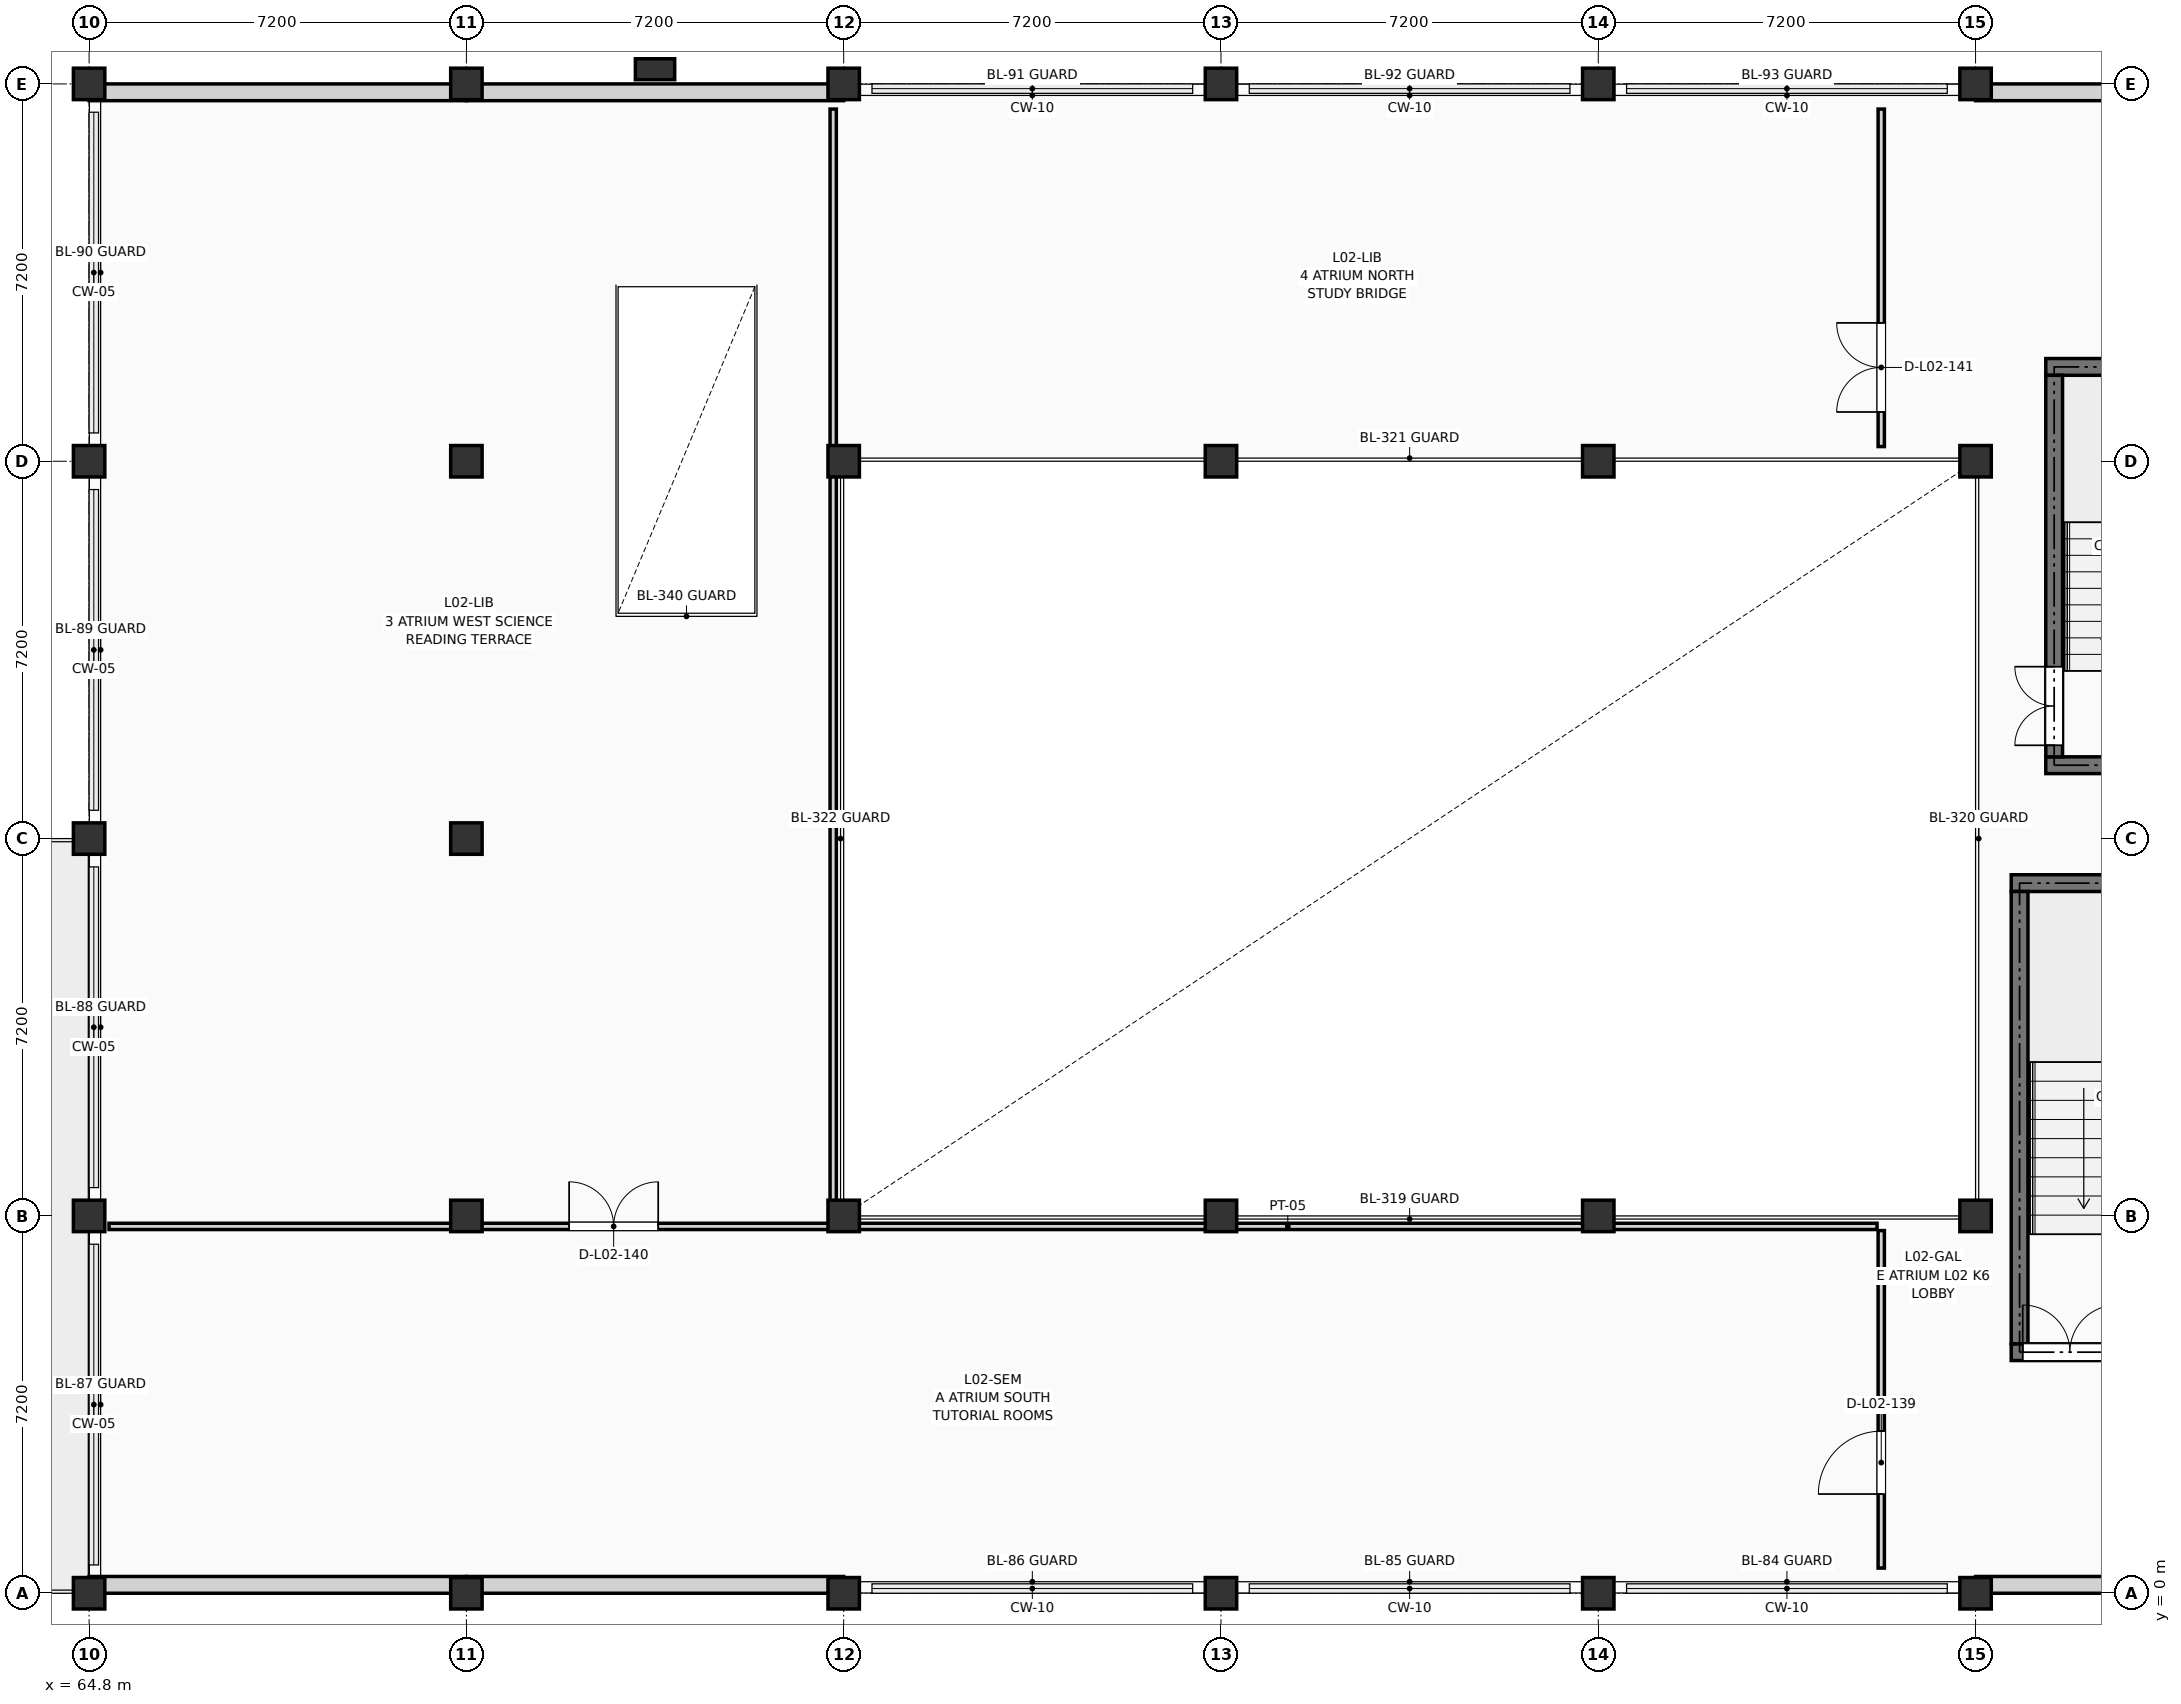
"""IFC4 building model, lengths in metres.
Left out: names, types, materials, properties, quantities, classifications, styles, units other than length and angle.
Written with IfcOpenShell. Run it as: python <this file> out.ifc"""

import sys

from ifc_helpers import new_model, si_unit, direction, frame, frame_2d, origin, origin_2d, place, context, subcontext, project, spatial, rectangle, extrude, element, fill, save


model = new_model("IFC4")
c1 = context("Model", 3, precision=1e-05, world=origin(), true_north=direction((0.0, 1.0)))
c2 = subcontext(c1, "Body", "Model", "MODEL_VIEW")
j1 = project(units=[si_unit("LENGTHUNIT", "METRE"), si_unit("PLANEANGLEUNIT", "RADIAN")], contexts=[c1])
p1 = place(None, origin())
s1 = spatial("IfcSite", under=j1, at=p1, CompositionType="ELEMENT")
p2 = place(p1, origin())
s2 = spatial("IfcBuilding", under=s1, at=p2, CompositionType="ELEMENT")
p3 = place(p2, frame((0.0, 0.0, 8.55)))
s3 = spatial("IfcBuildingStorey", under=s2, at=p3, CompositionType="ELEMENT", Elevation=8.55)
for number, where, z_axis, x_axis in (
    (1, (64.8, 0.0, 0.0), (0.0, 0.0, 1.0), (1.0, 0.0, 0.0)),
    (2, (64.8, 7.2, 0.0), (0.0, 0.0, 1.0), (1.0, 0.0, 0.0)),
    (3, (64.8, 14.4, 0.0), (0.0, 0.0, 1.0), (1.0, 0.0, 0.0)),
    (4, (64.8, 21.6, 0.0), (0.0, 0.0, 1.0), (1.0, 0.0, 0.0)),
    (5, (64.8, 28.8, 0.0), (0.0, 0.0, 1.0), (1.0, 0.0, 0.0)),
    (6, (72.0, 0.0, 0.0), (0.0, 0.0, 1.0), (1.0, 0.0, 0.0)),
    (7, (72.0, 7.2, 0.0), (0.0, 0.0, 1.0), (1.0, 0.0, 0.0)),
    (8, (72.0, 14.4, 0.0), (0.0, 0.0, 1.0), (1.0, 0.0, 0.0)),
    (9, (72.0, 21.6, 0.0), (0.0, 0.0, 1.0), (1.0, 0.0, 0.0)),
    (10, (72.0, 28.8, 0.0), (0.0, 0.0, 1.0), (1.0, 0.0, 0.0)),
    (11, (79.2, 0.0, 0.0), (0.0, 0.0, 1.0), (1.0, 0.0, 0.0)),
    (12, (79.2, 7.2, 0.0), (0.0, 0.0, 1.0), (1.0, 0.0, 0.0)),
    (13, (79.2, 21.6, 0.0), (0.0, 0.0, 1.0), (1.0, 0.0, 0.0)),
    (14, (79.2, 28.8, 0.0), (0.0, 0.0, 1.0), (1.0, 0.0, 0.0)),
    (15, (86.4, 0.0, 0.0), (0.0, 0.0, 1.0), (1.0, 0.0, 0.0)),
    (16, (86.4, 7.2, 0.0), (0.0, 0.0, 1.0), (1.0, 0.0, 0.0)),
    (17, (86.4, 21.6, 0.0), (0.0, 0.0, 1.0), (1.0, 0.0, 0.0)),
    (18, (86.4, 28.8, 0.0), (0.0, 0.0, 1.0), (1.0, 0.0, 0.0)),
    (19, (93.6, 0.0, 0.0), (0.0, 0.0, 1.0), (1.0, 0.0, 0.0)),
    (20, (93.6, 7.2, 0.0), (0.0, 0.0, 1.0), (1.0, 0.0, 0.0)),
    (21, (93.6, 21.6, 0.0), (0.0, 0.0, 1.0), (1.0, 0.0, 0.0)),
    (22, (93.6, 28.8, 0.0), (0.0, 0.0, 1.0), (1.0, 0.0, 0.0)),
    (23, (100.8, 0.0, 0.0), (0.0, 0.0, 1.0), (1.0, 0.0, 0.0)),
    (24, (100.8, 7.2, 0.0), (0.0, 0.0, 1.0), (1.0, 0.0, 0.0)),
    (25, (100.8, 21.6, 0.0), (0.0, 0.0, 1.0), (1.0, 0.0, 0.0)),
    (26, (100.8, 28.8, 0.0), (0.0, 0.0, 1.0), (1.0, 0.0, 0.0)),
):
    element("IfcColumn", number, at=place(p3, frame(where, z_axis=z_axis, x_axis=x_axis)), inside=s3, PredefinedType="COLUMN", context=c2, shape_type="SweptSolid", body=[
        extrude(rectangle(XDim=0.6, YDim=0.6, at=origin_2d()), origin(), (0.0, 0.0, 1.0), 3.6),
    ])
p4 = place(p3, frame((75.6, 29.08, 0.0), z_axis=(0.0, 0.0, 1.0), x_axis=(0.0, 1.0, 0.0)))
e27 = element("IfcColumn", 27, at=p4, inside=s3, PredefinedType="PILASTER", context=c2, shape_type="SweptSolid", body=[
    extrude(rectangle(XDim=0.4, YDim=0.75, at=origin_2d()), origin(), (0.0, 0.0, 1.0), 3.6),
])
for number, where, z_axis, x_axis in (
    (28, (100.8, 0.16, 0.0), (0.0, 0.0, 1.0), (1.0, 0.0, 0.0)),
    (29, (72.0, 0.16, 0.0), (0.0, 0.0, 1.0), (1.0, 0.0, 0.0)),
    (30, (64.8, 0.16, 0.0), (0.0, 0.0, 1.0), (1.0, 0.0, 0.0)),
    (31, (64.8, 28.64, 0.0), (0.0, 0.0, 1.0), (1.0, 0.0, 0.0)),
    (32, (72.0, 28.64, 0.0), (0.0, 0.0, 1.0), (1.0, 0.0, 0.0)),
    (33, (100.8, 28.64, 0.0), (0.0, 0.0, 1.0), (1.0, 0.0, 0.0)),
):
    element("IfcWall", number, at=place(p3, frame(where, z_axis=z_axis, x_axis=x_axis)), inside=s3, PredefinedType="SOLIDWALL", context=c2, shape_type="SweptSolid", body=[
        extrude(rectangle(XDim=7.2, YDim=0.32, at=frame_2d((3.6, 0.0))), origin(), (0.0, 0.0, 1.0), 2.84),
    ])
for number, where, z_axis, x_axis in (
    (34, (102.14, 15.8, 0.0), (0.0, 0.0, 1.0), (1.0, 0.0, 0.0)),
    (35, (102.14, 23.4, 0.0), (0.0, 0.0, 1.0), (1.0, 0.0, 0.0)),
):
    element("IfcWall", number, at=place(p3, frame(where, z_axis=z_axis, x_axis=x_axis)), inside=s3, PredefinedType="SHEAR", context=c2, shape_type="SweptSolid", body=[
        extrude(rectangle(XDim=4.44, YDim=0.32, at=frame_2d((2.22, 0.0))), origin(), (0.0, 0.0, 1.0), 3.39),
    ])
p5 = place(p3, frame((102.3, 15.96, 0.0), z_axis=(0.0, 0.0, 1.0), x_axis=(0.0, 1.0, 0.0)))
e36 = element("IfcWall", 36, at=p5, inside=s3, PredefinedType="SHEAR", context=c2, shape_type="SweptSolid", body=[
    extrude(rectangle(XDim=7.28, YDim=0.32, at=frame_2d((3.64, 0.0))), origin(), (0.0, 0.0, 1.0), 3.39),
])
p6 = place(p5, frame((0.22, 0.0, 0.0)))
e37 = element("IfcOpeningElement", 37, at=p6, cuts=e36, PredefinedType="OPENING", context=c2, shape_type="SweptSolid", body=[
    extrude(rectangle(XDim=1.5, YDim=2.2, at=frame_2d((0.75, 1.1))), frame((0.0, 0.172, 0.0), z_axis=(0.0, -1.0, 0.0), x_axis=(1.0, 0.0, 0.0)), (0.0, 0.0, 1.0), 0.344),
])
p7 = place(p3, frame((101.48, 4.6, 0.0), z_axis=(0.0, 0.0, 1.0), x_axis=(1.0, 0.0, 0.0)))
e38 = element("IfcWall", 38, at=p7, inside=s3, PredefinedType="SHEAR", context=c2, shape_type="SweptSolid", body=[
    extrude(rectangle(XDim=5.84, YDim=0.32, at=frame_2d((2.92, 0.0))), origin(), (0.0, 0.0, 1.0), 3.39),
])
p8 = place(p7, frame((0.22, 0.0, 0.0)))
e39 = element("IfcOpeningElement", 39, at=p8, cuts=e38, PredefinedType="OPENING", context=c2, shape_type="SweptSolid", body=[
    extrude(rectangle(XDim=1.8, YDim=2.2, at=frame_2d((0.9, 1.1))), frame((0.0, 0.172, 0.0), z_axis=(0.0, -1.0, 0.0), x_axis=(1.0, 0.0, 0.0)), (0.0, 0.0, 1.0), 0.344),
])
p9 = place(p3, frame((101.48, 13.55, 0.0), z_axis=(0.0, 0.0, 1.0), x_axis=(1.0, 0.0, 0.0)))
e40 = element("IfcWall", 40, at=p9, inside=s3, PredefinedType="SHEAR", context=c2, shape_type="SweptSolid", body=[
    extrude(rectangle(XDim=5.84, YDim=0.32, at=frame_2d((2.92, 0.0))), origin(), (0.0, 0.0, 1.0), 3.39),
])
p10 = place(p3, frame((101.64, 4.76, 0.0), z_axis=(0.0, 0.0, 1.0), x_axis=(0.0, 1.0, 0.0)))
e41 = element("IfcWall", 41, at=p10, inside=s3, PredefinedType="SHEAR", context=c2, shape_type="SweptSolid", body=[
    extrude(rectangle(XDim=8.63, YDim=0.32, at=frame_2d((4.315, 0.0))), origin(), (0.0, 0.0, 1.0), 3.39),
])
p11 = place(p3, frame((99.0, 0.48, 0.0), z_axis=(0.0, 0.0, 1.0), x_axis=(0.0, 1.0, 0.0)))
e42 = element("IfcWall", 42, at=p11, inside=s3, PredefinedType="PARTITIONING", context=c2, shape_type="SweptSolid", body=[
    extrude(rectangle(XDim=6.44, YDim=0.12, at=frame_2d((3.22, 0.0))), origin(), (0.0, 0.0, 1.0), 3.375),
])
p12 = place(p11, frame((1.413, 0.0, 0.0)))
e43 = element("IfcOpeningElement", 43, at=p12, cuts=e42, PredefinedType="OPENING", context=c2, shape_type="SweptSolid", body=[
    extrude(rectangle(XDim=1.2, YDim=2.15, at=frame_2d((0.6, 1.075))), frame((0.0, 0.072, 0.0), z_axis=(0.0, -1.0, 0.0), x_axis=(1.0, 0.0, 0.0)), (0.0, 0.0, 1.0), 0.144),
])
p13 = place(p3, frame((65.18, 7.0, 0.0), z_axis=(0.0, 0.0, 1.0), x_axis=(1.0, 0.0, 0.0)))
e44 = element("IfcWall", 44, at=p13, inside=s3, PredefinedType="PARTITIONING", context=c2, shape_type="SweptSolid", body=[
    extrude(rectangle(XDim=33.74, YDim=0.12, at=frame_2d((16.87, 0.0))), origin(), (0.0, 0.0, 1.0), 2.595),
])
p14 = place(p13, frame((8.781, 0.0, 0.0)))
e45 = element("IfcOpeningElement", 45, at=p14, cuts=e44, PredefinedType="OPENING", context=c2, shape_type="SweptSolid", body=[
    extrude(rectangle(XDim=1.7, YDim=2.28, at=frame_2d((0.85, 1.14))), frame((0.0, 0.072, 0.0), z_axis=(0.0, -1.0, 0.0), x_axis=(1.0, 0.0, 0.0)), (0.0, 0.0, 1.0), 0.144),
])
p15 = place(p3, frame((79.0, 7.1, 0.0), z_axis=(0.0, 0.0, 1.0), x_axis=(0.0, 1.0, 0.0)))
e46 = element("IfcWall", 46, at=p15, inside=s3, PredefinedType="PARTITIONING", context=c2, shape_type="SweptSolid", body=[
    extrude(rectangle(XDim=21.22, YDim=0.12, at=frame_2d((10.61, 0.0))), origin(), (0.0, 0.0, 1.0), 3.375),
])
p16 = place(p3, frame((99.0, 21.88, 0.0), z_axis=(0.0, 0.0, 1.0), x_axis=(0.0, 1.0, 0.0)))
e47 = element("IfcWall", 47, at=p16, inside=s3, PredefinedType="PARTITIONING", context=c2, shape_type="SweptSolid", body=[
    extrude(rectangle(XDim=6.44, YDim=0.12, at=frame_2d((3.22, 0.0))), origin(), (0.0, 0.0, 1.0), 3.375),
])
p17 = place(p16, frame((0.66, 0.0, 0.0)))
e48 = element("IfcOpeningElement", 48, at=p17, cuts=e47, PredefinedType="OPENING", context=c2, shape_type="SweptSolid", body=[
    extrude(rectangle(XDim=1.7, YDim=2.28, at=frame_2d((0.85, 1.14))), frame((0.0, 0.072, 0.0), z_axis=(0.0, -1.0, 0.0), x_axis=(1.0, 0.0, 0.0)), (0.0, 0.0, 1.0), 0.144),
])
p18 = place(p6, origin())
e49 = element("IfcDoor", 49, at=p18, inside=s3, OperationType="DOUBLE_DOOR_SINGLE_SWING", PredefinedType="DOOR", context=c2, shape_type="SweptSolid", body=[
    extrude(rectangle(XDim=1.5, YDim=2.2, at=frame_2d((0.75, 1.1))), frame((0.0, 0.025, 0.0), z_axis=(0.0, -1.0, 0.0), x_axis=(1.0, 0.0, 0.0)), (0.0, 0.0, 1.0), 0.05),
])
fill(e37, e49)
p19 = place(p8, origin())
e50 = element("IfcDoor", 50, at=p19, inside=s3, OperationType="DOUBLE_DOOR_SINGLE_SWING", PredefinedType="DOOR", context=c2, shape_type="SweptSolid", body=[
    extrude(rectangle(XDim=1.8, YDim=2.2, at=frame_2d((0.9, 1.1))), frame((0.0, 0.025, 0.0), z_axis=(0.0, -1.0, 0.0), x_axis=(1.0, 0.0, 0.0)), (0.0, 0.0, 1.0), 0.05),
])
fill(e39, e50)
p20 = place(p12, origin())
e51 = element("IfcDoor", 51, at=p20, inside=s3, OperationType="SINGLE_SWING_LEFT", PredefinedType="DOOR", context=c2, shape_type="SweptSolid", body=[
    extrude(rectangle(XDim=1.2, YDim=2.15, at=frame_2d((0.6, 1.075))), frame((0.0, 0.025, 0.0), z_axis=(0.0, -1.0, 0.0), x_axis=(1.0, 0.0, 0.0)), (0.0, 0.0, 1.0), 0.05),
])
fill(e43, e51)
p21 = place(p14, origin())
e52 = element("IfcDoor", 52, at=p21, inside=s3, OperationType="DOUBLE_DOOR_SINGLE_SWING", PredefinedType="DOOR", context=c2, shape_type="SweptSolid", body=[
    extrude(rectangle(XDim=1.7, YDim=2.28, at=frame_2d((0.85, 1.14))), frame((0.0, 0.025, 0.0), z_axis=(0.0, -1.0, 0.0), x_axis=(1.0, 0.0, 0.0)), (0.0, 0.0, 1.0), 0.05),
])
fill(e45, e52)
p22 = place(p17, origin())
e53 = element("IfcDoor", 53, at=p22, inside=s3, OperationType="DOUBLE_DOOR_SINGLE_SWING", PredefinedType="DOOR", context=c2, shape_type="SweptSolid", body=[
    extrude(rectangle(XDim=1.7, YDim=2.28, at=frame_2d((0.85, 1.14))), frame((0.0, 0.025, 0.0), z_axis=(0.0, -1.0, 0.0), x_axis=(1.0, 0.0, 0.0)), (0.0, 0.0, 1.0), 0.05),
])
fill(e48, e53)
save(model, sys.argv[1])
